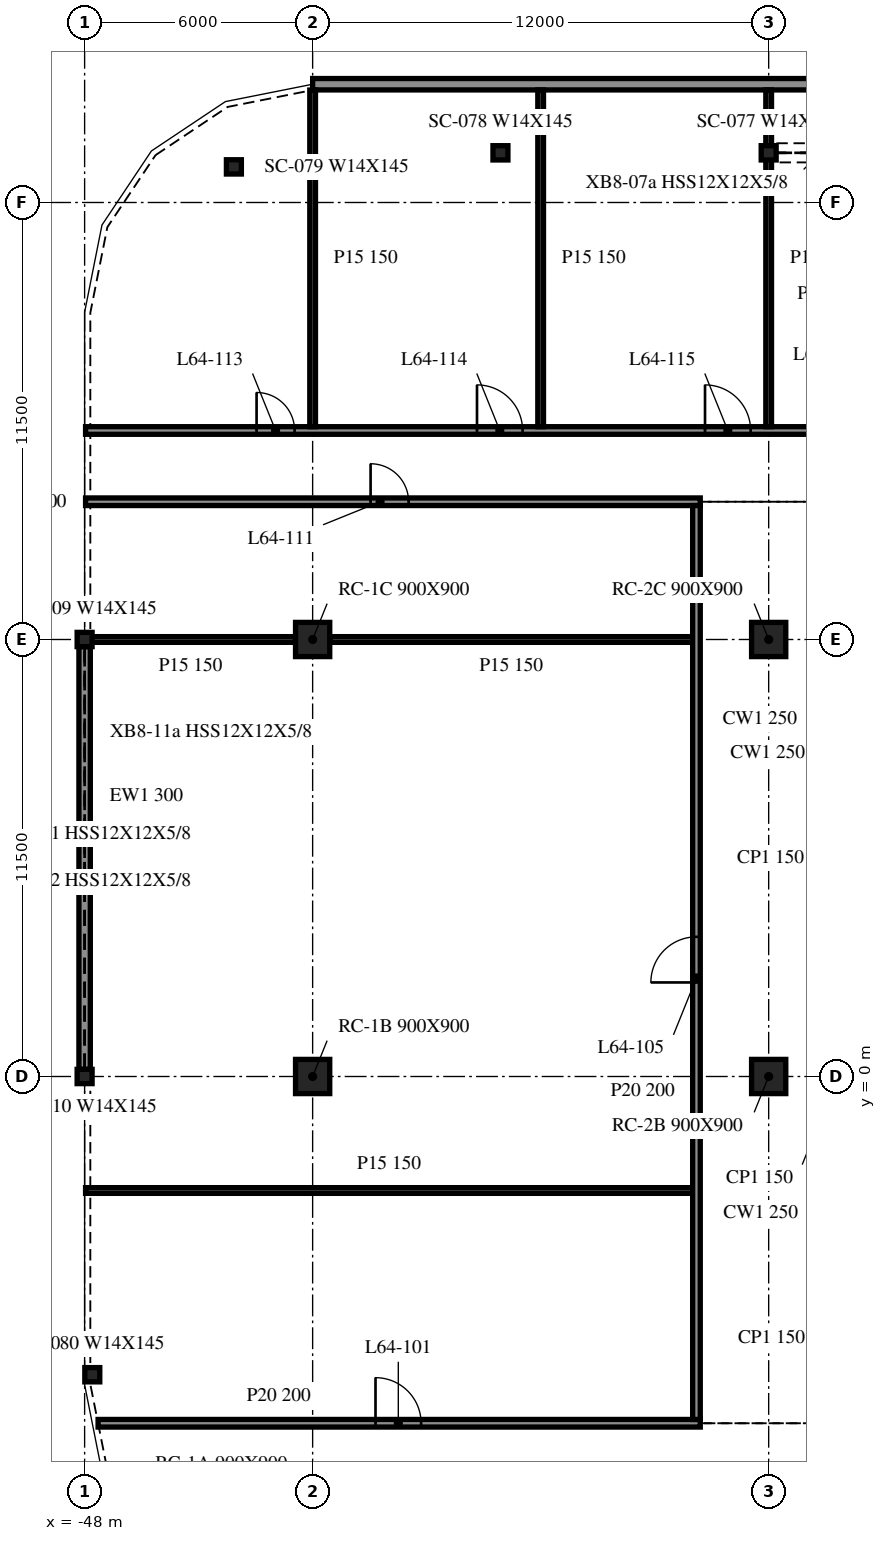
"""IFC4 building model, lengths in metres.
Left out: names, types, materials, properties, quantities, classifications, styles, units other than length and angle.
Written with IfcOpenShell. Run it as: python <this file> out.ifc"""

import sys

from ifc_helpers import new_model, si_unit, direction, frame, frame_2d, origin, origin_2d, place, context, subcontext, project, spatial, rectangle, i_section, extrude, element, fill, save


model = new_model("IFC4")
c1 = context("Model", 3, precision=1e-05, world=origin(), true_north=direction((0.0, 1.0)))
c2 = subcontext(c1, "Body", "Model", "MODEL_VIEW")
j1 = project(units=[si_unit("LENGTHUNIT", "METRE"), si_unit("PLANEANGLEUNIT", "RADIAN")], contexts=[c1])
p1 = place(None, origin())
s1 = spatial("IfcSite", under=j1, at=p1, CompositionType="ELEMENT")
p2 = place(p1, origin())
s2 = spatial("IfcBuilding", under=s1, at=p2, CompositionType="ELEMENT")
p3 = place(p2, frame((0.0, 0.0, 263.3)))
s3 = spatial("IfcBuildingStorey", under=s2, at=p3, CompositionType="ELEMENT", Elevation=263.3)
for number, where, z_axis, x_axis in (
    (1, (-42.0, 0.0, -0.34), (0.0, 0.0, 1.0), (1.0, 0.0, 0.0)),
    (2, (-42.0, 11.5, -0.34), (0.0, 0.0, 1.0), (1.0, 0.0, 0.0)),
    (3, (-30.0, 0.0, -0.34), (0.0, 0.0, 1.0), (1.0, 0.0, 0.0)),
    (4, (-30.0, 11.5, -0.34), (0.0, 0.0, 1.0), (1.0, 0.0, 0.0)),
):
    element("IfcColumn", number, at=place(p3, frame(where, z_axis=z_axis, x_axis=x_axis)), inside=s3, PredefinedType="COLUMN", context=c2, shape_type="SweptSolid", body=[
        extrude(rectangle(XDim=0.9, YDim=0.9, at=origin_2d()), origin(), (0.0, 0.0, 1.0), 3.8),
    ])
for number, where, z_axis, x_axis in (
    (5, (-30.0, 24.307, -0.34), (0.0, 0.0, 1.0), (1.0, 0.0, 0.0)),
    (6, (-37.058, 24.307, -0.34), (0.0, 0.0, 1.0), (1.0, 0.0, 0.0)),
    (7, (-44.072, 23.937, -0.34), (0.0, 0.0, 1.0), (1.0, 0.0, 0.0)),
    (8, (-48.0, 11.5, -0.34), (0.0, 0.0, 1.0), (1.0, 0.0, 0.0)),
    (9, (-48.0, 0.0, -0.34), (0.0, 0.0, 1.0), (1.0, 0.0, 0.0)),
    (10, (-47.798, -7.848, -0.34), (0.0, 0.0, 1.0), (1.0, 0.0, 0.0)),
):
    element("IfcColumn", number, at=place(p3, frame(where, z_axis=z_axis, x_axis=x_axis)), inside=s3, PredefinedType="COLUMN", context=c2, shape_type="SweptSolid", body=[
        extrude(i_section(OverallWidth=0.394, OverallDepth=0.376, WebThickness=0.017, FlangeThickness=0.028, at=origin_2d()), origin(), (0.0, 0.0, 1.0), 3.8),
    ])
p4 = place(p3, frame((42.0, 26.112, 0.0), z_axis=(0.0, 0.0, 1.0), x_axis=(-1.0, 0.0, 0.0)))
e11 = element("IfcWall", 11, at=p4, inside=s3, PredefinedType="NOTDEFINED", context=c2, shape_type="SweptSolid", body=[
    extrude(rectangle(XDim=84.0, YDim=0.3, at=frame_2d((42.0, 0.0))), origin(), (0.0, 0.0, 1.0), 2.853),
])
p5 = place(p3, frame((-48.0, 11.312, 0.0), z_axis=(0.0, 0.0, 1.0), x_axis=(0.0, -1.0, 0.0)))
e12 = element("IfcWall", 12, at=p5, inside=s3, PredefinedType="NOTDEFINED", context=c2, shape_type="SweptSolid", body=[
    extrude(rectangle(XDim=11.124, YDim=0.3, at=frame_2d((5.562, 0.0))), origin(), (0.0, 0.0, 1.0), 2.853),
])
p6 = place(p3, frame((-47.646, -9.125, 0.0), z_axis=(0.0, 0.0, 1.0), x_axis=(1.0, 0.0, 0.0)))
e13 = element("IfcWall", 13, at=p6, inside=s3, PredefinedType="PARTITIONING", context=c2, shape_type="SweptSolid", body=[
    extrude(rectangle(XDim=15.845, YDim=0.2, at=frame_2d((7.923, 0.0))), origin(), (0.0, 0.0, 1.0), 3.46),
])
p7 = place(p6, frame((7.3, 0.0, 0.0)))
e14 = element("IfcOpeningElement", 14, at=p7, cuts=e13, PredefinedType="OPENING", context=c2, shape_type="SweptSolid", body=[
    extrude(rectangle(XDim=1.2, YDim=2.1, at=frame_2d((0.6, 1.05))), frame((0.0, 0.11, 0.0), z_axis=(0.0, -1.0, 0.0), x_axis=(1.0, 0.0, 0.0)), (0.0, 0.0, 1.0), 0.22),
])
p8 = place(p3, frame((-47.975, -3.0, 0.0), z_axis=(0.0, 0.0, 1.0), x_axis=(1.0, 0.0, 0.0)))
e15 = element("IfcWall", 15, at=p8, inside=s3, PredefinedType="PARTITIONING", context=c2, shape_type="SweptSolid", body=[
    extrude(rectangle(XDim=15.975, YDim=0.15, at=frame_2d((7.988, 0.0))), origin(), (0.0, 0.0, 1.0), 3.46),
])
p9 = place(p3, frame((-47.975, 11.5, 0.0), z_axis=(0.0, 0.0, 1.0), x_axis=(1.0, 0.0, 0.0)))
e16 = element("IfcWall", 16, at=p9, inside=s3, PredefinedType="PARTITIONING", context=c2, shape_type="SweptSolid", body=[
    extrude(rectangle(XDim=5.525, YDim=0.15, at=frame_2d((2.763, 0.0))), origin(), (0.0, 0.0, 1.0), 3.46),
])
p10 = place(p3, frame((-41.55, 11.5, 0.0), z_axis=(0.0, 0.0, 1.0), x_axis=(1.0, 0.0, 0.0)))
e17 = element("IfcWall", 17, at=p10, inside=s3, PredefinedType="PARTITIONING", context=c2, shape_type="SweptSolid", body=[
    extrude(rectangle(XDim=9.55, YDim=0.15, at=frame_2d((4.775, 0.0))), origin(), (0.0, 0.0, 1.0), 3.46),
])
p11 = place(p3, frame((-47.975, 15.125, 0.0), z_axis=(0.0, 0.0, 1.0), x_axis=(1.0, 0.0, 0.0)))
e18 = element("IfcWall", 18, at=p11, inside=s3, PredefinedType="PARTITIONING", context=c2, shape_type="SweptSolid", body=[
    extrude(rectangle(XDim=16.175, YDim=0.2, at=frame_2d((8.087, 0.0))), origin(), (0.0, 0.0, 1.0), 3.46),
])
p12 = place(p11, frame((7.5, 0.0, 0.0)))
e19 = element("IfcOpeningElement", 19, at=p12, cuts=e18, PredefinedType="OPENING", context=c2, shape_type="SweptSolid", body=[
    extrude(rectangle(XDim=1.0, YDim=2.1, at=frame_2d((0.5, 1.05))), frame((0.0, 0.11, 0.0), z_axis=(0.0, -1.0, 0.0), x_axis=(1.0, 0.0, 0.0)), (0.0, 0.0, 1.0), 0.22),
])
p13 = place(p3, frame((-47.975, 17.0, 0.0), z_axis=(0.0, 0.0, 1.0), x_axis=(1.0, 0.0, 0.0)))
e20 = element("IfcWall", 20, at=p13, inside=s3, PredefinedType="PARTITIONING", context=c2, shape_type="SweptSolid", body=[
    extrude(rectangle(XDim=95.95, YDim=0.2, at=frame_2d((47.975, 0.0))), origin(), (0.0, 0.0, 1.0), 3.46),
])
p14 = place(p13, frame((4.5, 0.0, 0.0)))
e21 = element("IfcOpeningElement", 21, at=p14, cuts=e20, PredefinedType="OPENING", context=c2, shape_type="SweptSolid", body=[
    extrude(rectangle(XDim=1.0, YDim=2.1, at=frame_2d((0.5, 1.05))), frame((0.0, 0.11, 0.0), z_axis=(0.0, -1.0, 0.0), x_axis=(1.0, 0.0, 0.0)), (0.0, 0.0, 1.0), 0.22),
])
p15 = place(p13, frame((10.3, 0.0, 0.0)))
e22 = element("IfcOpeningElement", 22, at=p15, cuts=e20, PredefinedType="OPENING", context=c2, shape_type="SweptSolid", body=[
    extrude(rectangle(XDim=1.2, YDim=2.1, at=frame_2d((0.6, 1.05))), frame((0.0, 0.11, 0.0), z_axis=(0.0, -1.0, 0.0), x_axis=(1.0, 0.0, 0.0)), (0.0, 0.0, 1.0), 0.22),
])
p16 = place(p13, frame((16.3, 0.0, 0.0)))
e23 = element("IfcOpeningElement", 23, at=p16, cuts=e20, PredefinedType="OPENING", context=c2, shape_type="SweptSolid", body=[
    extrude(rectangle(XDim=1.2, YDim=2.1, at=frame_2d((0.6, 1.05))), frame((0.0, 0.11, 0.0), z_axis=(0.0, -1.0, 0.0), x_axis=(1.0, 0.0, 0.0)), (0.0, 0.0, 1.0), 0.22),
])
p17 = place(p13, frame((19.5, 0.0, 0.0)))
e24 = element("IfcOpeningElement", 24, at=p17, cuts=e20, PredefinedType="OPENING", context=c2, shape_type="SweptSolid", body=[
    extrude(rectangle(XDim=1.0, YDim=2.1, at=frame_2d((0.5, 1.05))), frame((0.0, 0.11, 0.0), z_axis=(0.0, -1.0, 0.0), x_axis=(1.0, 0.0, 0.0)), (0.0, 0.0, 1.0), 0.22),
])
p18 = place(p13, frame((25.3, 0.0, 0.0)))
e25 = element("IfcOpeningElement", 25, at=p18, cuts=e20, PredefinedType="OPENING", context=c2, shape_type="SweptSolid", body=[
    extrude(rectangle(XDim=1.2, YDim=2.1, at=frame_2d((0.6, 1.05))), frame((0.0, 0.11, 0.0), z_axis=(0.0, -1.0, 0.0), x_axis=(1.0, 0.0, 0.0)), (0.0, 0.0, 1.0), 0.22),
])
p19 = place(p13, frame((31.3, 0.0, 0.0)))
e26 = element("IfcOpeningElement", 26, at=p19, cuts=e20, PredefinedType="OPENING", context=c2, shape_type="SweptSolid", body=[
    extrude(rectangle(XDim=1.2, YDim=2.1, at=frame_2d((0.6, 1.05))), frame((0.0, 0.11, 0.0), z_axis=(0.0, -1.0, 0.0), x_axis=(1.0, 0.0, 0.0)), (0.0, 0.0, 1.0), 0.22),
])
p20 = place(p13, frame((37.5, 0.0, 0.0)))
e27 = element("IfcOpeningElement", 27, at=p20, cuts=e20, PredefinedType="OPENING", context=c2, shape_type="SweptSolid", body=[
    extrude(rectangle(XDim=1.0, YDim=2.1, at=frame_2d((0.5, 1.05))), frame((0.0, 0.11, 0.0), z_axis=(0.0, -1.0, 0.0), x_axis=(1.0, 0.0, 0.0)), (0.0, 0.0, 1.0), 0.22),
])
p21 = place(p13, frame((40.3, 0.0, 0.0)))
e28 = element("IfcOpeningElement", 28, at=p21, cuts=e20, PredefinedType="OPENING", context=c2, shape_type="SweptSolid", body=[
    extrude(rectangle(XDim=1.2, YDim=2.1, at=frame_2d((0.6, 1.05))), frame((0.0, 0.11, 0.0), z_axis=(0.0, -1.0, 0.0), x_axis=(1.0, 0.0, 0.0)), (0.0, 0.0, 1.0), 0.22),
])
p22 = place(p13, frame((46.3, 0.0, 0.0)))
e29 = element("IfcOpeningElement", 29, at=p22, cuts=e20, PredefinedType="OPENING", context=c2, shape_type="SweptSolid", body=[
    extrude(rectangle(XDim=1.2, YDim=2.1, at=frame_2d((0.6, 1.05))), frame((0.0, 0.11, 0.0), z_axis=(0.0, -1.0, 0.0), x_axis=(1.0, 0.0, 0.0)), (0.0, 0.0, 1.0), 0.22),
])
p23 = place(p13, frame((48.1, 0.0, 0.0)))
e30 = element("IfcOpeningElement", 30, at=p23, cuts=e20, PredefinedType="OPENING", context=c2, shape_type="SweptSolid", body=[
    extrude(rectangle(XDim=1.0, YDim=2.1, at=frame_2d((0.5, 1.05))), frame((0.0, 0.11, 0.0), z_axis=(0.0, -1.0, 0.0), x_axis=(1.0, 0.0, 0.0)), (0.0, 0.0, 1.0), 0.22),
])
p24 = place(p13, frame((54.1, 0.0, 0.0)))
e31 = element("IfcOpeningElement", 31, at=p24, cuts=e20, PredefinedType="OPENING", context=c2, shape_type="SweptSolid", body=[
    extrude(rectangle(XDim=1.2, YDim=2.1, at=frame_2d((0.6, 1.05))), frame((0.0, 0.11, 0.0), z_axis=(0.0, -1.0, 0.0), x_axis=(1.0, 0.0, 0.0)), (0.0, 0.0, 1.0), 0.22),
])
p25 = place(p13, frame((60.1, 0.0, 0.0)))
e32 = element("IfcOpeningElement", 32, at=p25, cuts=e20, PredefinedType="OPENING", context=c2, shape_type="SweptSolid", body=[
    extrude(rectangle(XDim=1.2, YDim=2.1, at=frame_2d((0.6, 1.05))), frame((0.0, 0.11, 0.0), z_axis=(0.0, -1.0, 0.0), x_axis=(1.0, 0.0, 0.0)), (0.0, 0.0, 1.0), 0.22),
])
p26 = place(p13, frame((63.1, 0.0, 0.0)))
e33 = element("IfcOpeningElement", 33, at=p26, cuts=e20, PredefinedType="OPENING", context=c2, shape_type="SweptSolid", body=[
    extrude(rectangle(XDim=1.0, YDim=2.1, at=frame_2d((0.5, 1.05))), frame((0.0, 0.11, 0.0), z_axis=(0.0, -1.0, 0.0), x_axis=(1.0, 0.0, 0.0)), (0.0, 0.0, 1.0), 0.22),
])
p27 = place(p13, frame((69.1, 0.0, 0.0)))
e34 = element("IfcOpeningElement", 34, at=p27, cuts=e20, PredefinedType="OPENING", context=c2, shape_type="SweptSolid", body=[
    extrude(rectangle(XDim=1.2, YDim=2.1, at=frame_2d((0.6, 1.05))), frame((0.0, 0.11, 0.0), z_axis=(0.0, -1.0, 0.0), x_axis=(1.0, 0.0, 0.0)), (0.0, 0.0, 1.0), 0.22),
])
p28 = place(p13, frame((75.1, 0.0, 0.0)))
e35 = element("IfcOpeningElement", 35, at=p28, cuts=e20, PredefinedType="OPENING", context=c2, shape_type="SweptSolid", body=[
    extrude(rectangle(XDim=1.2, YDim=2.1, at=frame_2d((0.6, 1.05))), frame((0.0, 0.11, 0.0), z_axis=(0.0, -1.0, 0.0), x_axis=(1.0, 0.0, 0.0)), (0.0, 0.0, 1.0), 0.22),
])
p29 = place(p13, frame((81.1, 0.0, 0.0)))
e36 = element("IfcOpeningElement", 36, at=p29, cuts=e20, PredefinedType="OPENING", context=c2, shape_type="SweptSolid", body=[
    extrude(rectangle(XDim=1.0, YDim=2.1, at=frame_2d((0.5, 1.05))), frame((0.0, 0.11, 0.0), z_axis=(0.0, -1.0, 0.0), x_axis=(1.0, 0.0, 0.0)), (0.0, 0.0, 1.0), 0.22),
])
p30 = place(p13, frame((84.1, 0.0, 0.0)))
e37 = element("IfcOpeningElement", 37, at=p30, cuts=e20, PredefinedType="OPENING", context=c2, shape_type="SweptSolid", body=[
    extrude(rectangle(XDim=1.2, YDim=2.1, at=frame_2d((0.6, 1.05))), frame((0.0, 0.11, 0.0), z_axis=(0.0, -1.0, 0.0), x_axis=(1.0, 0.0, 0.0)), (0.0, 0.0, 1.0), 0.22),
])
p31 = place(p13, frame((90.1, 0.0, 0.0)))
e38 = element("IfcOpeningElement", 38, at=p31, cuts=e20, PredefinedType="OPENING", context=c2, shape_type="SweptSolid", body=[
    extrude(rectangle(XDim=1.2, YDim=2.1, at=frame_2d((0.6, 1.05))), frame((0.0, 0.11, 0.0), z_axis=(0.0, -1.0, 0.0), x_axis=(1.0, 0.0, 0.0)), (0.0, 0.0, 1.0), 0.22),
])
p32 = place(p3, frame((-42.0, 17.1, 0.0), z_axis=(0.0, 0.0, 1.0), x_axis=(0.0, 1.0, 0.0)))
e39 = element("IfcWall", 39, at=p32, inside=s3, PredefinedType="PARTITIONING", context=c2, shape_type="SweptSolid", body=[
    extrude(rectangle(XDim=8.859, YDim=0.15, at=frame_2d((4.429, 0.0))), origin(), (0.0, 0.0, 1.0), 3.46),
])
p33 = place(p3, frame((-36.0, 17.1, 0.0), z_axis=(0.0, 0.0, 1.0), x_axis=(0.0, 1.0, 0.0)))
e40 = element("IfcWall", 40, at=p33, inside=s3, PredefinedType="PARTITIONING", context=c2, shape_type="SweptSolid", body=[
    extrude(rectangle(XDim=8.862, YDim=0.15, at=frame_2d((4.431, 0.0))), origin(), (0.0, 0.0, 1.0), 3.46),
])
p34 = place(p3, frame((-31.9, -9.025, 0.0), z_axis=(0.0, 0.0, 1.0), x_axis=(0.0, 1.0, 0.0)))
e41 = element("IfcWall", 41, at=p34, inside=s3, PredefinedType="PARTITIONING", context=c2, shape_type="SweptSolid", body=[
    extrude(rectangle(XDim=24.05, YDim=0.2, at=frame_2d((12.025, 0.0))), origin(), (0.0, 0.0, 1.0), 3.46),
])
p35 = place(p34, frame((11.5, 0.0, 0.0)))
e42 = element("IfcOpeningElement", 42, at=p35, cuts=e41, PredefinedType="OPENING", context=c2, shape_type="SweptSolid", body=[
    extrude(rectangle(XDim=1.2, YDim=2.1, at=frame_2d((0.6, 1.05))), frame((0.0, 0.11, 0.0), z_axis=(0.0, -1.0, 0.0), x_axis=(1.0, 0.0, 0.0)), (0.0, 0.0, 1.0), 0.22),
])
p36 = place(p3, frame((-30.0, 17.1, 0.0), z_axis=(0.0, 0.0, 1.0), x_axis=(0.0, 1.0, 0.0)))
e43 = element("IfcWall", 43, at=p36, inside=s3, PredefinedType="PARTITIONING", context=c2, shape_type="SweptSolid", body=[
    extrude(rectangle(XDim=8.862, YDim=0.15, at=frame_2d((4.431, 0.0))), origin(), (0.0, 0.0, 1.0), 3.46),
])
p37 = place(p7, origin())
e44 = element("IfcDoor", 44, at=p37, inside=s3, OperationType="SINGLE_SWING_LEFT", PredefinedType="DOOR", context=c2, shape_type="SweptSolid", body=[
    extrude(rectangle(XDim=1.2, YDim=2.1, at=frame_2d((0.6, 1.05))), frame((0.0, 0.025, 0.0), z_axis=(0.0, -1.0, 0.0), x_axis=(1.0, 0.0, 0.0)), (0.0, 0.0, 1.0), 0.05),
])
fill(e14, e44)
p38 = place(p35, origin())
e45 = element("IfcDoor", 45, at=p38, inside=s3, OperationType="SINGLE_SWING_RIGHT", PredefinedType="DOOR", context=c2, shape_type="SweptSolid", body=[
    extrude(rectangle(XDim=1.2, YDim=2.1, at=frame_2d((0.6, 1.05))), frame((0.0, 0.025, 0.0), z_axis=(0.0, -1.0, 0.0), x_axis=(1.0, 0.0, 0.0)), (0.0, 0.0, 1.0), 0.05),
])
fill(e42, e45)
p39 = place(p12, origin())
e46 = element("IfcDoor", 46, at=p39, inside=s3, OperationType="SINGLE_SWING_RIGHT", PredefinedType="DOOR", context=c2, shape_type="SweptSolid", body=[
    extrude(rectangle(XDim=1.0, YDim=2.1, at=frame_2d((0.5, 1.05))), frame((0.0, 0.025, 0.0), z_axis=(0.0, -1.0, 0.0), x_axis=(1.0, 0.0, 0.0)), (0.0, 0.0, 1.0), 0.05),
])
fill(e19, e46)
p40 = place(p14, origin())
e47 = element("IfcDoor", 47, at=p40, inside=s3, OperationType="SINGLE_SWING_LEFT", PredefinedType="DOOR", context=c2, shape_type="SweptSolid", body=[
    extrude(rectangle(XDim=1.0, YDim=2.1, at=frame_2d((0.5, 1.05))), frame((0.0, 0.025, 0.0), z_axis=(0.0, -1.0, 0.0), x_axis=(1.0, 0.0, 0.0)), (0.0, 0.0, 1.0), 0.05),
])
fill(e21, e47)
p41 = place(p15, origin())
e48 = element("IfcDoor", 48, at=p41, inside=s3, OperationType="SINGLE_SWING_LEFT", PredefinedType="DOOR", context=c2, shape_type="SweptSolid", body=[
    extrude(rectangle(XDim=1.2, YDim=2.1, at=frame_2d((0.6, 1.05))), frame((0.0, 0.025, 0.0), z_axis=(0.0, -1.0, 0.0), x_axis=(1.0, 0.0, 0.0)), (0.0, 0.0, 1.0), 0.05),
])
fill(e22, e48)
p42 = place(p16, origin())
e49 = element("IfcDoor", 49, at=p42, inside=s3, OperationType="SINGLE_SWING_LEFT", PredefinedType="DOOR", context=c2, shape_type="SweptSolid", body=[
    extrude(rectangle(XDim=1.2, YDim=2.1, at=frame_2d((0.6, 1.05))), frame((0.0, 0.025, 0.0), z_axis=(0.0, -1.0, 0.0), x_axis=(1.0, 0.0, 0.0)), (0.0, 0.0, 1.0), 0.05),
])
fill(e23, e49)
save(model, sys.argv[1])
